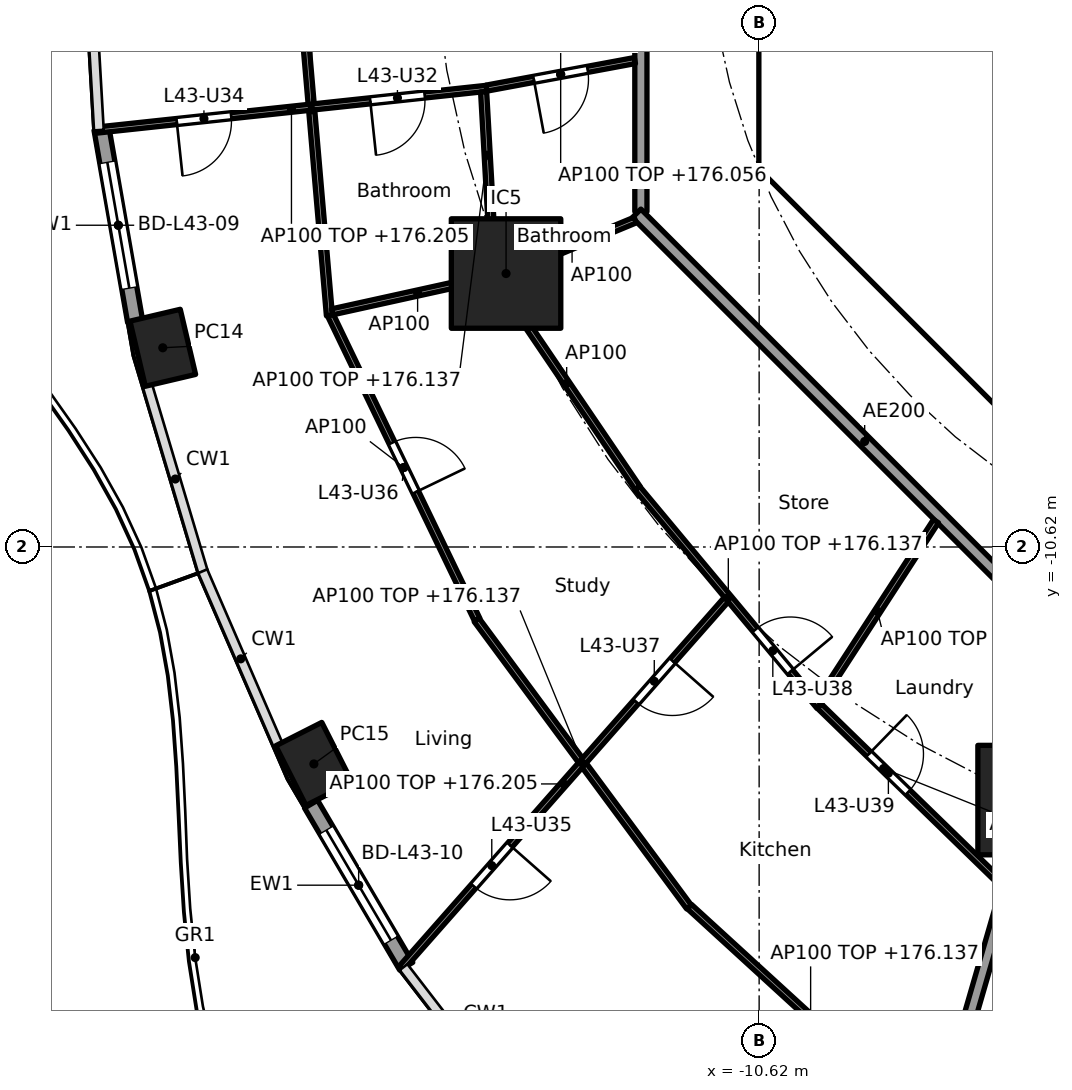
"""IFC4 building model, lengths in metres.
Left out: names, types, materials, properties, quantities, classifications, styles, units other than length and angle.
Written with IfcOpenShell. Run it as: python <this file> out.ifc"""

import sys

from ifc_helpers import new_model, si_unit, direction, frame, frame_2d, origin, origin_2d, place, context, subcontext, project, spatial, polyline, rectangle, hollow_rectangle, outline, extrude, element, fill, save


model = new_model("IFC4")
c1 = context("Model", 3, precision=1e-05, world=origin(), true_north=direction((0.0, 1.0)))
c2 = subcontext(c1, "Body", "Model", "MODEL_VIEW")
j1 = project(units=[si_unit("LENGTHUNIT", "METRE"), si_unit("PLANEANGLEUNIT", "RADIAN")], contexts=[c1])
p1 = place(None, origin())
s1 = spatial("IfcSite", under=j1, at=p1, CompositionType="ELEMENT")
p2 = place(p1, origin())
s2 = spatial("IfcBuilding", under=s1, at=p2, CompositionType="ELEMENT")
p3 = place(p2, frame((0.0, 0.0, 173.3)))
s3 = spatial("IfcBuildingStorey", under=s2, at=p3, CompositionType="ELEMENT", Elevation=173.3)
for number, where, z_axis, x_axis in (
    (1, (-20.427, -7.344, 0.0), (0.0, 0.0, 1.0), (0.229, -0.973, 0.0)),
    (2, (-17.942, -14.188, 0.0), (0.0, 0.0, 1.0), (0.452, -0.892, 0.0)),
):
    element("IfcColumn", number, at=place(p3, frame(where, z_axis=z_axis, x_axis=x_axis)), inside=s3, PredefinedType="COLUMN", context=c2, shape_type="SweptSolid", body=[
        extrude(hollow_rectangle(XDim=1.1, YDim=0.85, WallThickness=0.036, at=origin_2d()), origin(), (0.0, 0.0, 1.0), 3.7),
    ])
for number, where, z_axis, x_axis in (
    (3, (-14.782, -6.123, 0.0), (0.0, 0.0, 1.0), (1.0, 0.0, 0.0)),
    (4, (-6.123, -14.782, 0.0), (0.0, 0.0, 1.0), (1.0, 0.0, 0.0)),
):
    element("IfcColumn", number, at=place(p3, frame(where, z_axis=z_axis, x_axis=x_axis)), inside=s3, PredefinedType="COLUMN", context=c2, shape_type="SweptSolid", body=[
        extrude(rectangle(XDim=1.8, YDim=1.8, at=origin_2d()), origin(), (0.0, 0.0, 1.0), 3.7),
    ])
p4 = place(p3, frame((-20.882, -6.91, 0.0), z_axis=(0.0, 0.0, 1.0), x_axis=(-0.172223552479, 0.98505789067, 0.0)))
e5 = element("IfcWall", 5, at=p4, inside=s3, PredefinedType="SOLIDWALL", context=c2, shape_type="SweptSolid", body=[
    extrude(rectangle(XDim=3.211, YDim=0.25, at=frame_2d((1.605, 0.0))), origin(), (0.0, 0.0, 1.0), 3.44),
])
p5 = place(p4, frame((0.555, 0.0, 0.0)))
e6 = element("IfcOpeningElement", 6, at=p5, cuts=e5, PredefinedType="OPENING", context=c2, shape_type="SweptSolid", body=[
    extrude(rectangle(XDim=2.1, YDim=2.4, at=frame_2d((1.05, 1.2))), frame((0.0, 0.135, 0.0), z_axis=(0.0, -1.0, 0.0), x_axis=(1.0, 0.0, 0.0)), (0.0, 0.0, 1.0), 0.27),
])
p6 = place(p3, frame((-16.424, -17.515, 0.0), z_axis=(0.0, 0.0, 1.0), x_axis=(-0.506309086483, 0.862352079458, 0.0)))
e7 = element("IfcWall", 7, at=p6, inside=s3, PredefinedType="SOLIDWALL", context=c2, shape_type="SweptSolid", body=[
    extrude(rectangle(XDim=3.092, YDim=0.25, at=frame_2d((1.546, 0.0))), origin(), (0.0, 0.0, 1.0), 3.44),
])
p7 = place(p6, frame((0.496, 0.0, 0.0)))
e8 = element("IfcOpeningElement", 8, at=p7, cuts=e7, PredefinedType="OPENING", context=c2, shape_type="SweptSolid", body=[
    extrude(rectangle(XDim=2.1, YDim=2.4, at=frame_2d((1.05, 1.2))), frame((0.0, 0.135, 0.0), z_axis=(0.0, -1.0, 0.0), x_axis=(1.0, 0.0, 0.0)), (0.0, 0.0, 1.0), 0.27),
])
p8 = place(p3, frame((-10.325, 3.801, 0.0), z_axis=(0.0, 0.0, 1.0), x_axis=(0.0, -1.0, 0.0)))
e9 = element("IfcWall", 9, at=p8, inside=s3, PredefinedType="SHEAR", context=c2, shape_type="SweptSolid", body=[
    extrude(rectangle(XDim=7.602, YDim=0.6, at=frame_2d((3.801, 0.0))), origin(), (0.0, 0.0, 1.0), 3.44),
])
p9 = place(p8, frame((0.651, 0.0, 0.0)))
e10 = element("IfcOpeningElement", 10, at=p9, cuts=e9, PredefinedType="OPENING", context=c2, shape_type="SweptSolid", body=[
    extrude(rectangle(XDim=1.5, YDim=2.1, at=frame_2d((0.75, 1.05))), frame((0.0, 0.31, 0.0), z_axis=(0.0, -1.0, 0.0), x_axis=(1.0, 0.0, 0.0)), (0.0, 0.0, 1.0), 0.62),
])
p10 = place(p8, frame((5.451, 0.0, 0.0)))
e11 = element("IfcOpeningElement", 11, at=p10, cuts=e9, PredefinedType="OPENING", context=c2, shape_type="SweptSolid", body=[
    extrude(rectangle(XDim=1.5, YDim=2.1, at=frame_2d((0.75, 1.05))), frame((0.0, 0.31, 0.0), z_axis=(0.0, -1.0, 0.0), x_axis=(1.0, 0.0, 0.0)), (0.0, 0.0, 1.0), 0.62),
])
p11 = place(p3, frame((-9.988, -4.613, 0.0), z_axis=(0.0, 0.0, 1.0), x_axis=(0.707106781187, -0.707106781187, 0.0)))
e12 = element("IfcWall", 12, at=p11, inside=s3, PredefinedType="SHEAR", context=c2, shape_type="SweptSolid", body=[
    extrude(rectangle(XDim=7.602, YDim=0.6, at=frame_2d((3.801, 0.0))), origin(), (0.0, 0.0, 1.0), 3.44),
])
p12 = place(p11, frame((6.151, 0.0, 0.0)))
e13 = element("IfcOpeningElement", 13, at=p12, cuts=e12, PredefinedType="OPENING", context=c2, shape_type="SweptSolid", body=[
    extrude(rectangle(XDim=1.1, YDim=2.1, at=frame_2d((0.55, 1.05))), frame((0.0, 0.31, 0.0), z_axis=(0.0, -1.0, 0.0), x_axis=(1.0, 0.0, 0.0)), (0.0, 0.0, 1.0), 0.62),
])
p13 = place(p3, origin())
e14 = element("IfcWall", 14, at=p13, inside=s3, PredefinedType="SHEAR", context=c2, shape_type="SweptSolid", body=[
    extrude(outline(polyline([(-10.625, -3.801), (-10.025, -3.801), (-10.025, -4.152), (-9.776, -4.401), (-10.2, -4.825), (-10.625, -4.401), (-10.625, -3.801)])), origin(), (0.0, 0.0, 1.0), 3.44),
])
p14 = place(p3, frame((-10.025, -4.0, 0.0), z_axis=(0.0, 0.0, 1.0), x_axis=(1.0, 0.0, 0.0)))
e15 = element("IfcWall", 15, at=p14, inside=s3, PredefinedType="PARTITIONING", context=c2, shape_type="SweptSolid", body=[
    extrude(rectangle(XDim=3.325, YDim=0.2, at=frame_2d((1.662, 0.0))), origin(), (0.0, 0.0, 1.0), 3.44),
])
p15 = place(p3, frame((-6.137, -14.83, 0.0), z_axis=(0.0, 0.0, 1.0), x_axis=(-0.278461169897, -0.96044748782, 0.0)))
e16 = element("IfcWall", 16, at=p15, inside=s3, PredefinedType="PARTITIONING", context=c2, shape_type="SweptSolid", body=[
    extrude(rectangle(XDim=9.573, YDim=0.2, at=frame_2d((4.787, 0.0))), origin(), (0.0, 0.0, 1.0), 2.837),
])
p16 = place(p3, frame((-12.565, 5.304, 0.0), z_axis=(0.0, 0.0, 1.0), x_axis=(0.0, -1.0, 0.0)))
e17 = element("IfcWall", 17, at=p16, inside=s3, PredefinedType="PARTITIONING", context=c2, shape_type="SweptSolid", body=[
    extrude(rectangle(XDim=10.409, YDim=0.2, at=frame_2d((5.205, 0.0))), origin(), (0.0, 0.0, 1.0), 3.44),
])
p17 = place(p16, frame((6.106, 0.0, 0.0)))
e18 = element("IfcOpeningElement", 18, at=p17, cuts=e17, PredefinedType="OPENING", context=c2, shape_type="SweptSolid", body=[
    extrude(rectangle(XDim=1.0, YDim=2.1, at=frame_2d((0.5, 1.05))), frame((0.0, 0.11, 0.0), z_axis=(0.0, -1.0, 0.0), x_axis=(1.0, 0.0, 0.0)), (0.0, 0.0, 1.0), 0.22),
])
p18 = place(p3, frame((-12.635, -5.134, 0.0), z_axis=(0.0, 0.0, 1.0), x_axis=(0.707106781187, -0.707106781187, 0.0)))
e19 = element("IfcWall", 19, at=p18, inside=s3, PredefinedType="PARTITIONING", context=c2, shape_type="SweptSolid", body=[
    extrude(rectangle(XDim=10.609, YDim=0.2, at=frame_2d((5.305, 0.0))), origin(), (0.0, 0.0, 1.0), 3.44),
])
p19 = place(p3, frame((-18.271, -0.05, 0.0), z_axis=(0.0, 0.0, 1.0), x_axis=(0.086018199227, -0.996293565874, 0.0)))
e20 = element("IfcWall", 20, at=p19, inside=s3, PredefinedType="PARTITIONING", context=c2, shape_type="SweptSolid", body=[
    extrude(rectangle(XDim=6.789, YDim=0.1, at=frame_2d((3.395, 0.0))), origin(), (0.0, 0.0, 1.0), 2.837),
])
p20 = place(p3, frame((-12.663, -2.621, 0.0), z_axis=(0.0, 0.0, 1.0), x_axis=(-0.983176884312, -0.182655999505, 0.0)))
e21 = element("IfcWall", 21, at=p20, inside=s3, PredefinedType="PARTITIONING", context=c2, shape_type="SweptSolid", body=[
    extrude(rectangle(XDim=2.483, YDim=0.1, at=frame_2d((1.242, 0.0))), origin(), (0.0, 0.0, 1.0), 2.756),
])
p21 = place(p20, frame((0.792, 0.0, 0.0)))
e22 = element("IfcOpeningElement", 22, at=p21, cuts=e21, PredefinedType="OPENING", context=c2, shape_type="SweptSolid", body=[
    extrude(rectangle(XDim=0.9, YDim=2.1, at=frame_2d((0.45, 1.05))), frame((0.0, 0.06, 0.0), z_axis=(0.0, -1.0, 0.0), x_axis=(1.0, 0.0, 0.0)), (0.0, 0.0, 1.0), 0.12),
])
p22 = place(p3, frame((-15.104, -3.078, 0.0), z_axis=(0.0, 0.0, 1.0), x_axis=(-0.994316167803, -0.106467640365, 0.0)))
e23 = element("IfcWall", 23, at=p22, inside=s3, PredefinedType="PARTITIONING", context=c2, shape_type="SweptSolid", body=[
    extrude(rectangle(XDim=6.45, YDim=0.1, at=frame_2d((3.225, 0.0))), origin(), (0.0, 0.0, 1.0), 2.905),
])
p23 = place(p22, frame((1.022, 0.0, 0.0)))
e24 = element("IfcOpeningElement", 24, at=p23, cuts=e23, PredefinedType="OPENING", context=c2, shape_type="SweptSolid", body=[
    extrude(rectangle(XDim=0.9, YDim=2.1, at=frame_2d((0.45, 1.05))), frame((0.0, 0.06, 0.0), z_axis=(0.0, -1.0, 0.0), x_axis=(1.0, 0.0, 0.0)), (0.0, 0.0, 1.0), 0.12),
])
p24 = place(p22, frame((4.223, 0.0, 0.0)))
e25 = element("IfcOpeningElement", 25, at=p24, cuts=e23, PredefinedType="OPENING", context=c2, shape_type="SweptSolid", body=[
    extrude(rectangle(XDim=0.9, YDim=2.1, at=frame_2d((0.45, 1.05))), frame((0.0, 0.06, 0.0), z_axis=(0.0, -1.0, 0.0), x_axis=(1.0, 0.0, 0.0)), (0.0, 0.0, 1.0), 0.12),
])
p25 = place(p3, frame((-15.151, -3.133, 0.0), z_axis=(0.0, 0.0, 1.0), x_axis=(0.05637501378, -0.998409664327, 0.0)))
e26 = element("IfcWall", 26, at=p25, inside=s3, PredefinedType="PARTITIONING", context=c2, shape_type="SweptSolid", body=[
    extrude(rectangle(XDim=2.988, YDim=0.1, at=frame_2d((1.494, 0.0))), origin(), (0.0, 0.0, 1.0), 2.837),
])
p26 = place(p3, frame((-12.657, -5.243, 0.0), z_axis=(0.0, 0.0, 1.0), x_axis=(-0.923848837015, -0.382757529444, 0.0)))
e27 = element("IfcWall", 27, at=p26, inside=s3, PredefinedType="PARTITIONING", context=c2, shape_type="SweptSolid", body=[
    extrude(rectangle(XDim=2.25, YDim=0.1, at=frame_2d((1.125, 0.0))), origin(), (0.0, 0.0, 1.0), 3.44),
])
p27 = place(p3, frame((-14.831, -6.134, 0.0), z_axis=(0.0, 0.0, 1.0), x_axis=(-0.976560749847, -0.215241961191, 0.0)))
e28 = element("IfcWall", 28, at=p27, inside=s3, PredefinedType="PARTITIONING", context=c2, shape_type="SweptSolid", body=[
    extrude(rectangle(XDim=2.879, YDim=0.1, at=frame_2d((1.439, 0.0))), origin(), (0.0, 0.0, 1.0), 3.44),
])
p28 = place(p3, frame((-14.952, -6.208, 0.0), z_axis=(0.0, 0.0, 1.0), x_axis=(0.561064907171, -0.827771810308, 0.0)))
e29 = element("IfcWall", 29, at=p28, inside=s3, PredefinedType="PARTITIONING", context=c2, shape_type="SweptSolid", body=[
    extrude(rectangle(XDim=4.159, YDim=0.1, at=frame_2d((2.079, 0.0))), origin(), (0.0, 0.0, 1.0), 3.44),
])
p29 = place(p3, frame((-17.669, -6.809, 0.0), z_axis=(0.0, 0.0, 1.0), x_axis=(0.434040130629, -0.900893536997, 0.0)))
e30 = element("IfcWall", 30, at=p29, inside=s3, PredefinedType="PARTITIONING", context=c2, shape_type="SweptSolid", body=[
    extrude(rectangle(XDim=5.558, YDim=0.1, at=frame_2d((2.779, 0.0))), origin(), (0.0, 0.0, 1.0), 3.44),
])
p30 = place(p29, frame((2.329, 0.0, 0.0)))
e31 = element("IfcOpeningElement", 31, at=p30, cuts=e30, PredefinedType="OPENING", context=c2, shape_type="SweptSolid", body=[
    extrude(rectangle(XDim=0.9, YDim=2.1, at=frame_2d((0.45, 1.05))), frame((0.0, 0.06, 0.0), z_axis=(0.0, -1.0, 0.0), x_axis=(1.0, 0.0, 0.0)), (0.0, 0.0, 1.0), 0.12),
])
p31 = place(p3, frame((-12.623, -9.653, 0.0), z_axis=(0.0, 0.0, 1.0), x_axis=(0.640297481347, -0.768127030758, 0.0)))
e32 = element("IfcWall", 32, at=p31, inside=s3, PredefinedType="PARTITIONING", context=c2, shape_type="SweptSolid", body=[
    extrude(rectangle(XDim=4.672, YDim=0.1, at=frame_2d((2.336, 0.0))), origin(), (0.0, 0.0, 1.0), 2.837),
])
p32 = place(p31, frame((3.029, 0.0, 0.0)))
e33 = element("IfcOpeningElement", 33, at=p32, cuts=e32, PredefinedType="OPENING", context=c2, shape_type="SweptSolid", body=[
    extrude(rectangle(XDim=0.9, YDim=2.1, at=frame_2d((0.45, 1.05))), frame((0.0, 0.06, 0.0), z_axis=(0.0, -1.0, 0.0), x_axis=(1.0, 0.0, 0.0)), (0.0, 0.0, 1.0), 0.12),
])
p33 = place(p3, frame((-15.265, -11.821, 0.0), z_axis=(0.0, 0.0, 1.0), x_axis=(0.594711348772, -0.803939308432, 0.0)))
e34 = element("IfcWall", 34, at=p33, inside=s3, PredefinedType="PARTITIONING", context=c2, shape_type="SweptSolid", body=[
    extrude(rectangle(XDim=5.872, YDim=0.1, at=frame_2d((2.936, 0.0))), origin(), (0.0, 0.0, 1.0), 2.837),
])
p34 = place(p3, frame((-11.16, -11.485, 0.0), z_axis=(0.0, 0.0, 1.0), x_axis=(-0.661275898802, -0.750142776852, 0.0)))
e35 = element("IfcWall", 35, at=p34, inside=s3, PredefinedType="PARTITIONING", context=c2, shape_type="SweptSolid", body=[
    extrude(rectangle(XDim=8.083, YDim=0.1, at=frame_2d((4.041, 0.0))), origin(), (0.0, 0.0, 1.0), 2.905),
])
p35 = place(p34, frame((5.382, 0.0, 0.0)))
e36 = element("IfcOpeningElement", 36, at=p35, cuts=e35, PredefinedType="OPENING", context=c2, shape_type="SweptSolid", body=[
    extrude(rectangle(XDim=0.9, YDim=2.1, at=frame_2d((0.45, 1.05))), frame((0.0, 0.06, 0.0), z_axis=(0.0, -1.0, 0.0), x_axis=(1.0, 0.0, 0.0)), (0.0, 0.0, 1.0), 0.12),
])
p36 = place(p34, frame((1.341, 0.0, 0.0)))
e37 = element("IfcOpeningElement", 37, at=p36, cuts=e35, PredefinedType="OPENING", context=c2, shape_type="SweptSolid", body=[
    extrude(rectangle(XDim=0.9, YDim=2.1, at=frame_2d((0.45, 1.05))), frame((0.0, 0.06, 0.0), z_axis=(0.0, -1.0, 0.0), x_axis=(1.0, 0.0, 0.0)), (0.0, 0.0, 1.0), 0.12),
])
p37 = place(p3, frame((-7.712, -10.195, 0.0), z_axis=(0.0, 0.0, 1.0), x_axis=(-0.544170086001, -0.838974920663, 0.0)))
e38 = element("IfcWall", 38, at=p37, inside=s3, PredefinedType="PARTITIONING", context=c2, shape_type="SweptSolid", body=[
    extrude(rectangle(XDim=3.535, YDim=0.1, at=frame_2d((1.768, 0.0))), origin(), (0.0, 0.0, 1.0), 2.756),
])
p38 = place(p3, frame((-9.627, -13.238, 0.0), z_axis=(0.0, 0.0, 1.0), x_axis=(0.716919058692, -0.697156412352, 0.0)))
e39 = element("IfcWall", 39, at=p38, inside=s3, PredefinedType="PARTITIONING", context=c2, shape_type="SweptSolid", body=[
    extrude(rectangle(XDim=4.2, YDim=0.1, at=frame_2d((2.1, 0.0))), origin(), (0.0, 0.0, 1.0), 2.837),
])
p39 = place(p38, frame((1.13, 0.0, 0.0)))
e40 = element("IfcOpeningElement", 40, at=p39, cuts=e39, PredefinedType="OPENING", context=c2, shape_type="SweptSolid", body=[
    extrude(rectangle(XDim=0.9, YDim=2.1, at=frame_2d((0.45, 1.05))), frame((0.0, 0.06, 0.0), z_axis=(0.0, -1.0, 0.0), x_axis=(1.0, 0.0, 0.0)), (0.0, 0.0, 1.0), 0.12),
])
p40 = place(p3, frame((-11.766, -16.535, 0.0), z_axis=(0.0, 0.0, 1.0), x_axis=(0.73807320557, -0.674720640872, 0.0)))
e41 = element("IfcWall", 41, at=p40, inside=s3, PredefinedType="PARTITIONING", context=c2, shape_type="SweptSolid", body=[
    extrude(rectangle(XDim=5.399, YDim=0.1, at=frame_2d((2.699, 0.0))), origin(), (0.0, 0.0, 1.0), 2.837),
])
p41 = place(p5, origin())
e42 = element("IfcDoor", 42, at=p41, inside=s3, OperationType="SLIDING_TO_LEFT", PredefinedType="DOOR", context=c2, shape_type="SweptSolid", body=[
    extrude(rectangle(XDim=2.1, YDim=2.4, at=frame_2d((1.05, 1.2))), frame((0.0, 0.025, 0.0), z_axis=(0.0, -1.0, 0.0), x_axis=(1.0, 0.0, 0.0)), (0.0, 0.0, 1.0), 0.05),
])
fill(e6, e42)
p42 = place(p7, origin())
e43 = element("IfcDoor", 43, at=p42, inside=s3, OperationType="SLIDING_TO_LEFT", PredefinedType="DOOR", context=c2, shape_type="SweptSolid", body=[
    extrude(rectangle(XDim=2.1, YDim=2.4, at=frame_2d((1.05, 1.2))), frame((0.0, 0.025, 0.0), z_axis=(0.0, -1.0, 0.0), x_axis=(1.0, 0.0, 0.0)), (0.0, 0.0, 1.0), 0.05),
])
fill(e8, e43)
p43 = place(p10, origin())
e44 = element("IfcDoor", 44, at=p43, inside=s3, OperationType="DOUBLE_DOOR_SINGLE_SWING", PredefinedType="DOOR", context=c2, shape_type="SweptSolid", body=[
    extrude(rectangle(XDim=1.5, YDim=2.1, at=frame_2d((0.75, 1.05))), frame((0.0, 0.025, 0.0), z_axis=(0.0, -1.0, 0.0), x_axis=(1.0, 0.0, 0.0)), (0.0, 0.0, 1.0), 0.05),
])
fill(e11, e44)
p44 = place(p21, origin())
e45 = element("IfcDoor", 45, at=p44, inside=s3, OperationType="SINGLE_SWING_RIGHT", PredefinedType="DOOR", context=c2, shape_type="SweptSolid", body=[
    extrude(rectangle(XDim=0.9, YDim=2.1, at=frame_2d((0.45, 1.05))), frame((0.0, 0.025, 0.0), z_axis=(0.0, -1.0, 0.0), x_axis=(1.0, 0.0, 0.0)), (0.0, 0.0, 1.0), 0.05),
])
fill(e22, e45)
p45 = place(p23, origin())
e46 = element("IfcDoor", 46, at=p45, inside=s3, OperationType="SINGLE_SWING_RIGHT", PredefinedType="DOOR", context=c2, shape_type="SweptSolid", body=[
    extrude(rectangle(XDim=0.9, YDim=2.1, at=frame_2d((0.45, 1.05))), frame((0.0, 0.025, 0.0), z_axis=(0.0, -1.0, 0.0), x_axis=(1.0, 0.0, 0.0)), (0.0, 0.0, 1.0), 0.05),
])
fill(e24, e46)
p46 = place(p24, origin())
e47 = element("IfcDoor", 47, at=p46, inside=s3, OperationType="SINGLE_SWING_RIGHT", PredefinedType="DOOR", context=c2, shape_type="SweptSolid", body=[
    extrude(rectangle(XDim=0.9, YDim=2.1, at=frame_2d((0.45, 1.05))), frame((0.0, 0.025, 0.0), z_axis=(0.0, -1.0, 0.0), x_axis=(1.0, 0.0, 0.0)), (0.0, 0.0, 1.0), 0.05),
])
fill(e25, e47)
p47 = place(p35, origin())
e48 = element("IfcDoor", 48, at=p47, inside=s3, OperationType="SINGLE_SWING_LEFT", PredefinedType="DOOR", context=c2, shape_type="SweptSolid", body=[
    extrude(rectangle(XDim=0.9, YDim=2.1, at=frame_2d((0.45, 1.05))), frame((0.0, 0.025, 0.0), z_axis=(0.0, -1.0, 0.0), x_axis=(1.0, 0.0, 0.0)), (0.0, 0.0, 1.0), 0.05),
])
fill(e36, e48)
p48 = place(p30, origin())
e49 = element("IfcDoor", 49, at=p48, inside=s3, OperationType="SINGLE_SWING_RIGHT", PredefinedType="DOOR", context=c2, shape_type="SweptSolid", body=[
    extrude(rectangle(XDim=0.9, YDim=2.1, at=frame_2d((0.45, 1.05))), frame((0.0, 0.025, 0.0), z_axis=(0.0, -1.0, 0.0), x_axis=(1.0, 0.0, 0.0)), (0.0, 0.0, 1.0), 0.05),
])
fill(e31, e49)
p49 = place(p36, origin())
e50 = element("IfcDoor", 50, at=p49, inside=s3, OperationType="SINGLE_SWING_LEFT", PredefinedType="DOOR", context=c2, shape_type="SweptSolid", body=[
    extrude(rectangle(XDim=0.9, YDim=2.1, at=frame_2d((0.45, 1.05))), frame((0.0, 0.025, 0.0), z_axis=(0.0, -1.0, 0.0), x_axis=(1.0, 0.0, 0.0)), (0.0, 0.0, 1.0), 0.05),
])
fill(e37, e50)
p50 = place(p32, origin())
e51 = element("IfcDoor", 51, at=p50, inside=s3, OperationType="SINGLE_SWING_RIGHT", PredefinedType="DOOR", context=c2, shape_type="SweptSolid", body=[
    extrude(rectangle(XDim=0.9, YDim=2.1, at=frame_2d((0.45, 1.05))), frame((0.0, 0.025, 0.0), z_axis=(0.0, -1.0, 0.0), x_axis=(1.0, 0.0, 0.0)), (0.0, 0.0, 1.0), 0.05),
])
fill(e33, e51)
p51 = place(p39, origin())
e52 = element("IfcDoor", 52, at=p51, inside=s3, OperationType="SINGLE_SWING_LEFT", PredefinedType="DOOR", context=c2, shape_type="SweptSolid", body=[
    extrude(rectangle(XDim=0.9, YDim=2.1, at=frame_2d((0.45, 1.05))), frame((0.0, 0.025, 0.0), z_axis=(0.0, -1.0, 0.0), x_axis=(1.0, 0.0, 0.0)), (0.0, 0.0, 1.0), 0.05),
])
fill(e40, e52)
save(model, sys.argv[1])
